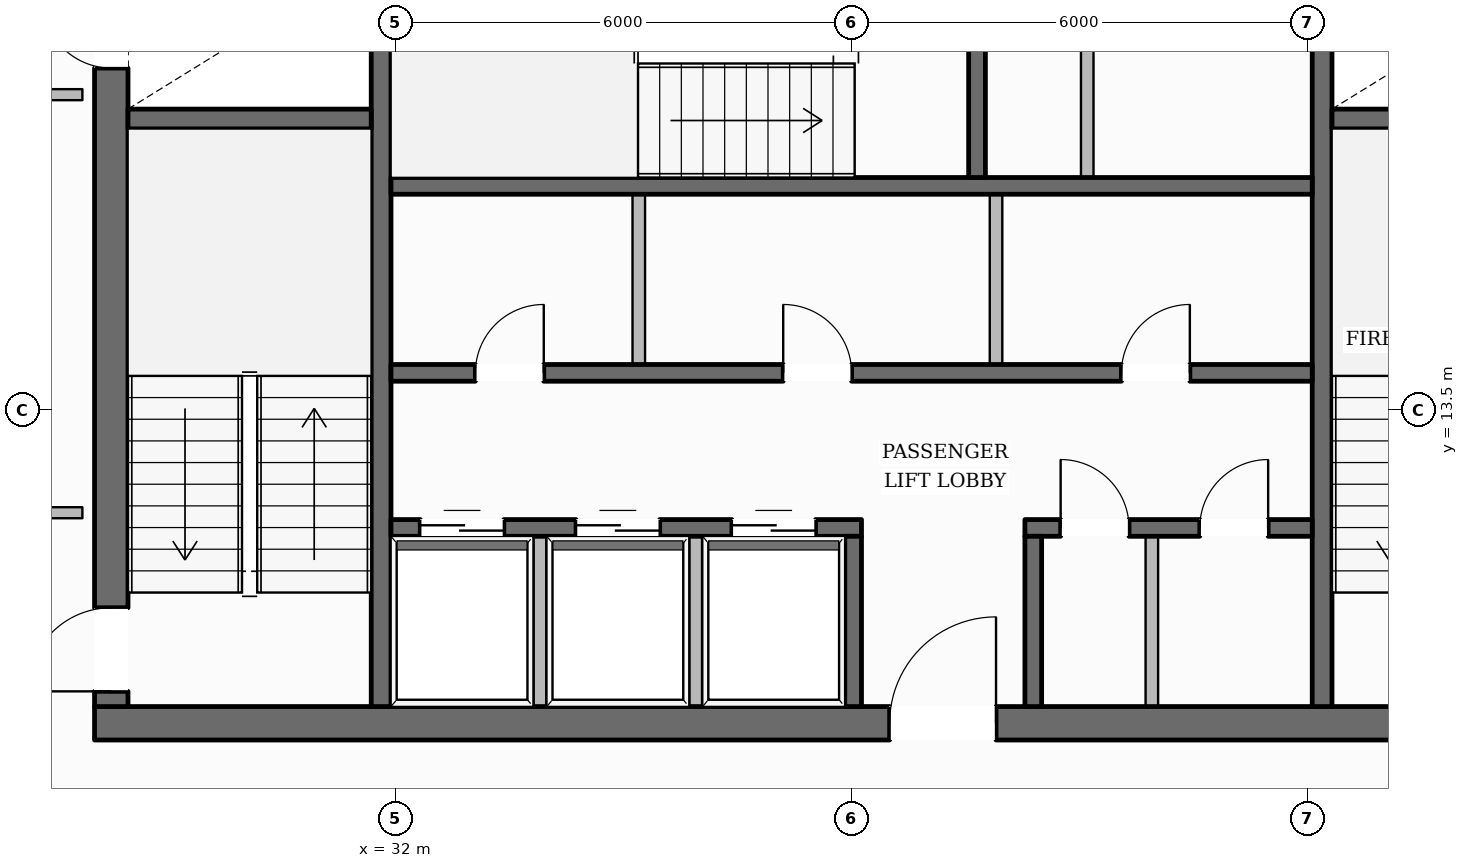
"""IFC4 building model, lengths in metres.
Left out: names, types, materials, properties, quantities, classifications, styles, units other than length and angle.
Written with IfcOpenShell. Run it as: python <this file> out.ifc"""

import sys

from ifc_helpers import new_model, si_unit, direction, frame, frame_2d, origin, place, context, subcontext, project, spatial, rectangle, extrude, element, fill, save


model = new_model("IFC4")
c1 = context("Model", 3, precision=1e-05, world=origin(), true_north=direction((0.0, 1.0)))
c2 = subcontext(c1, "Body", "Model", "MODEL_VIEW")
j1 = project(units=[si_unit("LENGTHUNIT", "METRE"), si_unit("PLANEANGLEUNIT", "RADIAN")], contexts=[c1])
p1 = place(None, origin())
s1 = spatial("IfcSite", under=j1, at=p1, CompositionType="ELEMENT")
p2 = place(p1, origin())
s2 = spatial("IfcBuilding", under=s1, at=p2, CompositionType="ELEMENT")
p3 = place(p2, frame((0.0, 0.0, 195.8)))
s3 = spatial("IfcBuildingStorey", under=s2, at=p3, CompositionType="ELEMENT", Elevation=195.8)
p4 = place(p3, frame((28.04, 9.38, 0.0), z_axis=(0.0, 0.0, 1.0), x_axis=(1.0, 0.0, 0.0)))
e1 = element("IfcWall", 1, at=p4, inside=s3, PredefinedType="SOLIDWALL", context=c2, shape_type="SweptSolid", body=[
    extrude(rectangle(XDim=19.92, YDim=0.44, at=frame_2d((9.96, 0.0))), origin(), (0.0, 0.0, 1.0), 3.6),
])
p5 = place(p4, frame((10.46, 0.0, 0.0)))
e2 = element("IfcOpeningElement", 2, at=p5, cuts=e1, PredefinedType="OPENING", context=c2, shape_type="SweptSolid", body=[
    extrude(rectangle(XDim=1.4, YDim=2.2, at=frame_2d((0.7, 1.1))), frame((0.0, 0.23, 0.0), z_axis=(0.0, -1.0, 0.0), x_axis=(1.0, 0.0, 0.0)), (0.0, 0.0, 1.0), 0.46),
])
p6 = place(p3, frame((28.26, 9.6, 0.0), z_axis=(0.0, 0.0, 1.0), x_axis=(0.0, 1.0, 0.0)))
e3 = element("IfcWall", 3, at=p6, inside=s3, PredefinedType="SOLIDWALL", context=c2, shape_type="SweptSolid", body=[
    extrude(rectangle(XDim=13.0, YDim=0.44, at=frame_2d((6.5, 0.0))), origin(), (0.0, 0.0, 1.0), 3.6),
])
p7 = place(p6, frame((0.2, 0.0, 0.0)))
e4 = element("IfcOpeningElement", 4, at=p7, cuts=e3, PredefinedType="OPENING", context=c2, shape_type="SweptSolid", body=[
    extrude(rectangle(XDim=1.1, YDim=2.15, at=frame_2d((0.55, 1.075))), frame((0.0, 0.23, 0.0), z_axis=(0.0, -1.0, 0.0), x_axis=(1.0, 0.0, 0.0)), (0.0, 0.0, 1.0), 0.46),
])
p8 = place(p6, frame((8.4, 0.0, 0.0)))
e5 = element("IfcOpeningElement", 5, at=p8, cuts=e3, PredefinedType="OPENING", context=c2, shape_type="SweptSolid", body=[
    extrude(rectangle(XDim=0.9, YDim=2.1, at=frame_2d((0.45, 1.05))), frame((0.0, 0.23, 0.0), z_axis=(0.0, -1.0, 0.0), x_axis=(1.0, 0.0, 0.0)), (0.0, 0.0, 1.0), 0.46),
])
p9 = place(p3, frame((31.81, 9.6, 0.0), z_axis=(0.0, 0.0, 1.0), x_axis=(0.0, 1.0, 0.0)))
e6 = element("IfcWall", 6, at=p9, inside=s3, PredefinedType="SHEAR", context=c2, shape_type="SweptSolid", body=[
    extrude(rectangle(XDim=13.0, YDim=0.26, at=frame_2d((6.5, 0.0))), origin(), (0.0, 0.0, 1.0), 3.6),
])
p10 = place(p9, frame((10.925, 0.0, 0.0)))
e7 = element("IfcOpeningElement", 7, at=p10, cuts=e6, PredefinedType="OPENING", context=c2, shape_type="SweptSolid", body=[
    extrude(rectangle(XDim=1.25, YDim=2.25, at=frame_2d((0.625, 1.125))), frame((0.0, 0.14, 0.0), z_axis=(0.0, -1.0, 0.0), x_axis=(1.0, 0.0, 0.0)), (0.0, 0.0, 1.0), 0.28),
])
p11 = place(p3, frame((44.19, 9.6, 0.0), z_axis=(0.0, 0.0, 1.0), x_axis=(0.0, 1.0, 0.0)))
e8 = element("IfcWall", 8, at=p11, inside=s3, PredefinedType="SHEAR", context=c2, shape_type="SweptSolid", body=[
    extrude(rectangle(XDim=13.0, YDim=0.26, at=frame_2d((6.5, 0.0))), origin(), (0.0, 0.0, 1.0), 3.6),
])
p12 = place(p11, frame((10.925, 0.0, 0.0)))
e9 = element("IfcOpeningElement", 9, at=p12, cuts=e8, PredefinedType="OPENING", context=c2, shape_type="SweptSolid", body=[
    extrude(rectangle(XDim=1.25, YDim=2.25, at=frame_2d((0.625, 1.125))), frame((0.0, 0.14, 0.0), z_axis=(0.0, -1.0, 0.0), x_axis=(1.0, 0.0, 0.0)), (0.0, 0.0, 1.0), 0.28),
])
for number, where, z_axis, x_axis in (
    (10, (28.48, 17.33, 0.0), (0.0, 0.0, 1.0), (1.0, 0.0, 0.0)),
    (11, (44.32, 17.33, 0.0), (0.0, 0.0, 1.0), (1.0, 0.0, 0.0)),
):
    element("IfcWall", number, at=place(p3, frame(where, z_axis=z_axis, x_axis=x_axis)), inside=s3, PredefinedType="SHEAR", context=c2, shape_type="SweptSolid", body=[
        extrude(rectangle(XDim=3.2, YDim=0.26, at=frame_2d((1.6, 0.0))), origin(), (0.0, 0.0, 1.0), 3.6),
    ])
p13 = place(p3, frame((31.94, 16.45, 0.0), z_axis=(0.0, 0.0, 1.0), x_axis=(1.0, 0.0, 0.0)))
e12 = element("IfcWall", 12, at=p13, inside=s3, PredefinedType="SOLIDWALL", context=c2, shape_type="SweptSolid", body=[
    extrude(rectangle(XDim=12.12, YDim=0.22, at=frame_2d((6.06, 0.0))), origin(), (0.0, 0.0, 1.0), 3.6),
])
p14 = place(p3, frame((39.65, 16.56, 0.0), z_axis=(0.0, 0.0, 1.0), x_axis=(0.0, 1.0, 0.0)))
e13 = element("IfcWall", 13, at=p14, inside=s3, PredefinedType="SOLIDWALL", context=c2, shape_type="SweptSolid", body=[
    extrude(rectangle(XDim=3.2, YDim=0.22, at=frame_2d((1.6, 0.0))), origin(), (0.0, 0.0, 1.0), 3.6),
])
p15 = place(p3, frame((31.94, 13.99, 0.0), z_axis=(0.0, 0.0, 1.0), x_axis=(1.0, 0.0, 0.0)))
e14 = element("IfcWall", 14, at=p15, inside=s3, PredefinedType="SOLIDWALL", context=c2, shape_type="SweptSolid", body=[
    extrude(rectangle(XDim=12.12, YDim=0.22, at=frame_2d((6.06, 0.0))), origin(), (0.0, 0.0, 1.0), 3.6),
])
p16 = place(p15, frame((1.11, 0.0, 0.0)))
e15 = element("IfcOpeningElement", 15, at=p16, cuts=e14, PredefinedType="OPENING", context=c2, shape_type="SweptSolid", body=[
    extrude(rectangle(XDim=0.9, YDim=2.1, at=frame_2d((0.45, 1.05))), frame((0.0, 0.12, 0.0), z_axis=(0.0, -1.0, 0.0), x_axis=(1.0, 0.0, 0.0)), (0.0, 0.0, 1.0), 0.24),
])
p17 = place(p15, frame((5.16, 0.0, 0.0)))
e16 = element("IfcOpeningElement", 16, at=p17, cuts=e14, PredefinedType="OPENING", context=c2, shape_type="SweptSolid", body=[
    extrude(rectangle(XDim=0.9, YDim=2.1, at=frame_2d((0.45, 1.05))), frame((0.0, 0.12, 0.0), z_axis=(0.0, -1.0, 0.0), x_axis=(1.0, 0.0, 0.0)), (0.0, 0.0, 1.0), 0.24),
])
p18 = place(p15, frame((9.61, 0.0, 0.0)))
e17 = element("IfcOpeningElement", 17, at=p18, cuts=e14, PredefinedType="OPENING", context=c2, shape_type="SweptSolid", body=[
    extrude(rectangle(XDim=0.9, YDim=2.1, at=frame_2d((0.45, 1.05))), frame((0.0, 0.12, 0.0), z_axis=(0.0, -1.0, 0.0), x_axis=(1.0, 0.0, 0.0)), (0.0, 0.0, 1.0), 0.24),
])
p19 = place(p3, frame((31.94, 11.95, 0.0), z_axis=(0.0, 0.0, 1.0), x_axis=(1.0, 0.0, 0.0)))
e18 = element("IfcWall", 18, at=p19, inside=s3, PredefinedType="SOLIDWALL", context=c2, shape_type="SweptSolid", body=[
    extrude(rectangle(XDim=6.19, YDim=0.22, at=frame_2d((3.095, 0.0))), origin(), (0.0, 0.0, 1.0), 3.6),
])
p20 = place(p19, frame((0.385, 0.0, 0.0)))
e19 = element("IfcOpeningElement", 19, at=p20, cuts=e18, PredefinedType="OPENING", context=c2, shape_type="SweptSolid", body=[
    extrude(rectangle(XDim=1.1, YDim=2.2, at=frame_2d((0.55, 1.1))), frame((0.0, 0.12, 0.0), z_axis=(0.0, -1.0, 0.0), x_axis=(1.0, 0.0, 0.0)), (0.0, 0.0, 1.0), 0.24),
])
p21 = place(p19, frame((2.435, 0.0, 0.0)))
e20 = element("IfcOpeningElement", 20, at=p21, cuts=e18, PredefinedType="OPENING", context=c2, shape_type="SweptSolid", body=[
    extrude(rectangle(XDim=1.1, YDim=2.2, at=frame_2d((0.55, 1.1))), frame((0.0, 0.12, 0.0), z_axis=(0.0, -1.0, 0.0), x_axis=(1.0, 0.0, 0.0)), (0.0, 0.0, 1.0), 0.24),
])
p22 = place(p19, frame((4.485, 0.0, 0.0)))
e21 = element("IfcOpeningElement", 21, at=p22, cuts=e18, PredefinedType="OPENING", context=c2, shape_type="SweptSolid", body=[
    extrude(rectangle(XDim=1.1, YDim=2.2, at=frame_2d((0.55, 1.1))), frame((0.0, 0.12, 0.0), z_axis=(0.0, -1.0, 0.0), x_axis=(1.0, 0.0, 0.0)), (0.0, 0.0, 1.0), 0.24),
])
p23 = place(p3, frame((40.28, 11.95, 0.0), z_axis=(0.0, 0.0, 1.0), x_axis=(1.0, 0.0, 0.0)))
e22 = element("IfcWall", 22, at=p23, inside=s3, PredefinedType="SOLIDWALL", context=c2, shape_type="SweptSolid", body=[
    extrude(rectangle(XDim=3.78, YDim=0.22, at=frame_2d((1.89, 0.0))), origin(), (0.0, 0.0, 1.0), 3.6),
])
p24 = place(p23, frame((0.47, 0.0, 0.0)))
e23 = element("IfcOpeningElement", 23, at=p24, cuts=e22, PredefinedType="OPENING", context=c2, shape_type="SweptSolid", body=[
    extrude(rectangle(XDim=0.9, YDim=2.1, at=frame_2d((0.45, 1.05))), frame((0.0, 0.12, 0.0), z_axis=(0.0, -1.0, 0.0), x_axis=(1.0, 0.0, 0.0)), (0.0, 0.0, 1.0), 0.24),
])
p25 = place(p23, frame((2.3, 0.0, 0.0)))
e24 = element("IfcOpeningElement", 24, at=p25, cuts=e22, PredefinedType="OPENING", context=c2, shape_type="SweptSolid", body=[
    extrude(rectangle(XDim=0.9, YDim=2.1, at=frame_2d((0.45, 1.05))), frame((0.0, 0.12, 0.0), z_axis=(0.0, -1.0, 0.0), x_axis=(1.0, 0.0, 0.0)), (0.0, 0.0, 1.0), 0.24),
])
for number, where, z_axis, x_axis in (
    (25, (38.02, 9.6, 0.0), (0.0, 0.0, 1.0), (0.0, 1.0, 0.0)),
    (26, (40.39, 9.6, 0.0), (0.0, 0.0, 1.0), (0.0, 1.0, 0.0)),
):
    element("IfcWall", number, at=place(p3, frame(where, z_axis=z_axis, x_axis=x_axis)), inside=s3, PredefinedType="SOLIDWALL", context=c2, shape_type="SweptSolid", body=[
        extrude(rectangle(XDim=2.24, YDim=0.22, at=frame_2d((1.12, 0.0))), origin(), (0.0, 0.0, 1.0), 3.6),
    ])
p26 = place(p3, frame((14.773, 11.555, 0.0), z_axis=(0.0, 0.0, 1.0), x_axis=(0.502113441051, 0.864801764751, 0.0)))
e27 = element("IfcWall", 27, at=p26, inside=s3, PredefinedType="STANDARD", context=c2, shape_type="SweptSolid", body=[
    extrude(rectangle(XDim=37.618, YDim=0.35, at=frame_2d((18.809, 0.0))), origin(), (0.0, 0.0, 1.0), 3.132),
])
p27 = place(p26, frame((33.36, 0.0, 0.65)))
e28 = element("IfcOpeningElement", 28, at=p27, cuts=e27, PredefinedType="OPENING", context=c2, shape_type="SweptSolid", body=[
    extrude(rectangle(XDim=1.45, YDim=1.75, at=frame_2d((0.725, 0.875))), frame((0.0, 0.185, 0.0), z_axis=(0.0, -1.0, 0.0), x_axis=(1.0, 0.0, 0.0)), (0.0, 0.0, 1.0), 0.37),
])
p28 = place(p26, frame((27.25, 0.0, 0.65)))
e29 = element("IfcOpeningElement", 29, at=p28, cuts=e27, PredefinedType="OPENING", context=c2, shape_type="SweptSolid", body=[
    extrude(rectangle(XDim=1.45, YDim=1.75, at=frame_2d((0.725, 0.875))), frame((0.0, 0.185, 0.0), z_axis=(0.0, -1.0, 0.0), x_axis=(1.0, 0.0, 0.0)), (0.0, 0.0, 1.0), 0.37),
])
p29 = place(p26, frame((15.03, 0.0, 0.65)))
e30 = element("IfcOpeningElement", 30, at=p29, cuts=e27, PredefinedType="OPENING", context=c2, shape_type="SweptSolid", body=[
    extrude(rectangle(XDim=1.45, YDim=1.75, at=frame_2d((0.725, 0.875))), frame((0.0, 0.185, 0.0), z_axis=(0.0, -1.0, 0.0), x_axis=(1.0, 0.0, 0.0)), (0.0, 0.0, 1.0), 0.37),
])
p30 = place(p26, frame((8.92, 0.0, 0.65)))
e31 = element("IfcOpeningElement", 31, at=p30, cuts=e27, PredefinedType="OPENING", context=c2, shape_type="SweptSolid", body=[
    extrude(rectangle(XDim=1.45, YDim=1.75, at=frame_2d((0.725, 0.875))), frame((0.0, 0.185, 0.0), z_axis=(0.0, -1.0, 0.0), x_axis=(1.0, 0.0, 0.0)), (0.0, 0.0, 1.0), 0.37),
])
p31 = place(p26, frame((2.811, 0.0, 0.65)))
e32 = element("IfcOpeningElement", 32, at=p31, cuts=e27, PredefinedType="OPENING", context=c2, shape_type="SweptSolid", body=[
    extrude(rectangle(XDim=1.45, YDim=1.75, at=frame_2d((0.725, 0.875))), frame((0.0, 0.185, 0.0), z_axis=(0.0, -1.0, 0.0), x_axis=(1.0, 0.0, 0.0)), (0.0, 0.0, 1.0), 0.37),
])
p32 = place(p3, frame((42.444, 44.024, 0.0), z_axis=(0.0, 0.0, 1.0), x_axis=(0.507770038723, -0.861492651028, 0.0)))
e33 = element("IfcWall", 33, at=p32, inside=s3, PredefinedType="STANDARD", context=c2, shape_type="SweptSolid", body=[
    extrude(rectangle(XDim=38.049, YDim=0.35, at=frame_2d((19.024, 0.0))), origin(), (0.0, 0.0, 1.0), 3.132),
])
p33 = place(p32, frame((33.752, 0.0, 0.65)))
e34 = element("IfcOpeningElement", 34, at=p33, cuts=e33, PredefinedType="OPENING", context=c2, shape_type="SweptSolid", body=[
    extrude(rectangle(XDim=1.45, YDim=1.75, at=frame_2d((0.725, 0.875))), frame((0.0, 0.185, 0.0), z_axis=(0.0, -1.0, 0.0), x_axis=(1.0, 0.0, 0.0)), (0.0, 0.0, 1.0), 0.37),
])
p34 = place(p32, frame((27.569, 0.0, 0.65)))
e35 = element("IfcOpeningElement", 35, at=p34, cuts=e33, PredefinedType="OPENING", context=c2, shape_type="SweptSolid", body=[
    extrude(rectangle(XDim=1.45, YDim=1.75, at=frame_2d((0.725, 0.875))), frame((0.0, 0.185, 0.0), z_axis=(0.0, -1.0, 0.0), x_axis=(1.0, 0.0, 0.0)), (0.0, 0.0, 1.0), 0.37),
])
p35 = place(p32, frame((15.204, 0.0, 0.65)))
e36 = element("IfcOpeningElement", 36, at=p35, cuts=e33, PredefinedType="OPENING", context=c2, shape_type="SweptSolid", body=[
    extrude(rectangle(XDim=1.45, YDim=1.75, at=frame_2d((0.725, 0.875))), frame((0.0, 0.185, 0.0), z_axis=(0.0, -1.0, 0.0), x_axis=(1.0, 0.0, 0.0)), (0.0, 0.0, 1.0), 0.37),
])
p36 = place(p32, frame((9.021, 0.0, 0.65)))
e37 = element("IfcOpeningElement", 37, at=p36, cuts=e33, PredefinedType="OPENING", context=c2, shape_type="SweptSolid", body=[
    extrude(rectangle(XDim=1.45, YDim=1.75, at=frame_2d((0.725, 0.875))), frame((0.0, 0.185, 0.0), z_axis=(0.0, -1.0, 0.0), x_axis=(1.0, 0.0, 0.0)), (0.0, 0.0, 1.0), 0.37),
])
p37 = place(p32, frame((2.839, 0.0, 0.65)))
e38 = element("IfcOpeningElement", 38, at=p37, cuts=e33, PredefinedType="OPENING", context=c2, shape_type="SweptSolid", body=[
    extrude(rectangle(XDim=1.45, YDim=1.75, at=frame_2d((0.725, 0.875))), frame((0.0, 0.185, 0.0), z_axis=(0.0, -1.0, 0.0), x_axis=(1.0, 0.0, 0.0)), (0.0, 0.0, 1.0), 0.37),
])
for number, where, z_axis, x_axis in (
    (39, (33.9, 9.52, 0.0), (0.0, 0.0, 1.0), (0.0, 1.0, 0.0)),
    (40, (35.95, 9.52, 0.0), (0.0, 0.0, 1.0), (0.0, 1.0, 0.0)),
):
    element("IfcWall", number, at=place(p3, frame(where, z_axis=z_axis, x_axis=x_axis)), inside=s3, PredefinedType="PARTITIONING", context=c2, shape_type="SweptSolid", body=[
        extrude(rectangle(XDim=2.32, YDim=0.165, at=frame_2d((1.16, 0.0))), origin(), (0.0, 0.0, 1.0), 3.6),
    ])
for number, where, z_axis, x_axis in (
    (41, (35.2, 14.1, 0.0), (0.0, 0.0, 1.0), (0.0, 1.0, 0.0)),
    (42, (39.9, 14.1, 0.0), (0.0, 0.0, 1.0), (0.0, 1.0, 0.0)),
):
    element("IfcWall", number, at=place(p3, frame(where, z_axis=z_axis, x_axis=x_axis)), inside=s3, PredefinedType="PARTITIONING", context=c2, shape_type="SweptSolid", body=[
        extrude(rectangle(XDim=2.24, YDim=0.165, at=frame_2d((1.12, 0.0))), origin(), (0.0, 0.0, 1.0), 3.6),
    ])
p38 = place(p3, frame((41.1, 16.56, 0.0), z_axis=(0.0, 0.0, 1.0), x_axis=(0.0, 1.0, 0.0)))
e43 = element("IfcWall", 43, at=p38, inside=s3, PredefinedType="PARTITIONING", context=c2, shape_type="SweptSolid", body=[
    extrude(rectangle(XDim=3.2, YDim=0.165, at=frame_2d((1.6, 0.0))), origin(), (0.0, 0.0, 1.0), 3.6),
])
p39 = place(p3, frame((41.95, 9.52, 0.0), z_axis=(0.0, 0.0, 1.0), x_axis=(0.0, 1.0, 0.0)))
e44 = element("IfcWall", 44, at=p39, inside=s3, PredefinedType="PARTITIONING", context=c2, shape_type="SweptSolid", body=[
    extrude(rectangle(XDim=2.32, YDim=0.165, at=frame_2d((1.16, 0.0))), origin(), (0.0, 0.0, 1.0), 3.6),
])
for number, where, z_axis, x_axis in (
    (45, (27.88, 17.65, 0.0), (0.0, 0.0, 1.0), (-1.0, 0.0, 0.0)),
    (46, (26.06, 12.15, 0.0), (0.0, 0.0, 1.0), (1.0, 0.0, 0.0)),
):
    element("IfcWall", number, at=place(p3, frame(where, z_axis=z_axis, x_axis=x_axis)), inside=s3, PredefinedType="PARTITIONING", context=c2, shape_type="SweptSolid", body=[
        extrude(rectangle(XDim=1.82, YDim=0.145, at=frame_2d((0.91, 0.0))), origin(), (0.0, 0.0, 1.0), 3.6),
    ])
p40 = place(p7, origin())
e47 = element("IfcDoor", 47, at=p40, inside=s3, OperationType="SINGLE_SWING_LEFT", PredefinedType="DOOR", context=c2, shape_type="SweptSolid", body=[
    extrude(rectangle(XDim=1.1, YDim=2.15, at=frame_2d((0.55, 1.075))), frame((0.0, 0.025, 0.0), z_axis=(0.0, -1.0, 0.0), x_axis=(1.0, 0.0, 0.0)), (0.0, 0.0, 1.0), 0.05),
])
fill(e4, e47)
p41 = place(p8, origin())
e48 = element("IfcDoor", 48, at=p41, inside=s3, OperationType="SINGLE_SWING_RIGHT", PredefinedType="DOOR", context=c2, shape_type="SweptSolid", body=[
    extrude(rectangle(XDim=0.9, YDim=2.1, at=frame_2d((0.45, 1.05))), frame((0.0, 0.025, 0.0), z_axis=(0.0, -1.0, 0.0), x_axis=(1.0, 0.0, 0.0)), (0.0, 0.0, 1.0), 0.05),
])
fill(e5, e48)
p42 = place(p5, origin())
e49 = element("IfcDoor", 49, at=p42, inside=s3, OperationType="SINGLE_SWING_RIGHT", PredefinedType="DOOR", context=c2, shape_type="SweptSolid", body=[
    extrude(rectangle(XDim=1.4, YDim=2.2, at=frame_2d((0.7, 1.1))), frame((0.0, 0.025, 0.0), z_axis=(0.0, -1.0, 0.0), x_axis=(1.0, 0.0, 0.0)), (0.0, 0.0, 1.0), 0.05),
])
fill(e2, e49)
p43 = place(p20, origin())
e50 = element("IfcDoor", 50, at=p43, inside=s3, OperationType="DOUBLE_DOOR_SLIDING", PredefinedType="DOOR", context=c2, shape_type="SweptSolid", body=[
    extrude(rectangle(XDim=1.1, YDim=2.2, at=frame_2d((0.55, 1.1))), frame((0.0, 0.025, 0.0), z_axis=(0.0, -1.0, 0.0), x_axis=(1.0, 0.0, 0.0)), (0.0, 0.0, 1.0), 0.05),
])
fill(e19, e50)
p44 = place(p21, origin())
e51 = element("IfcDoor", 51, at=p44, inside=s3, OperationType="DOUBLE_DOOR_SLIDING", PredefinedType="DOOR", context=c2, shape_type="SweptSolid", body=[
    extrude(rectangle(XDim=1.1, YDim=2.2, at=frame_2d((0.55, 1.1))), frame((0.0, 0.025, 0.0), z_axis=(0.0, -1.0, 0.0), x_axis=(1.0, 0.0, 0.0)), (0.0, 0.0, 1.0), 0.05),
])
fill(e20, e51)
p45 = place(p22, origin())
e52 = element("IfcDoor", 52, at=p45, inside=s3, OperationType="DOUBLE_DOOR_SLIDING", PredefinedType="DOOR", context=c2, shape_type="SweptSolid", body=[
    extrude(rectangle(XDim=1.1, YDim=2.2, at=frame_2d((0.55, 1.1))), frame((0.0, 0.025, 0.0), z_axis=(0.0, -1.0, 0.0), x_axis=(1.0, 0.0, 0.0)), (0.0, 0.0, 1.0), 0.05),
])
fill(e21, e52)
p46 = place(p16, origin())
e53 = element("IfcDoor", 53, at=p46, inside=s3, OperationType="SINGLE_SWING_RIGHT", PredefinedType="DOOR", context=c2, shape_type="SweptSolid", body=[
    extrude(rectangle(XDim=0.9, YDim=2.1, at=frame_2d((0.45, 1.05))), frame((0.0, 0.025, 0.0), z_axis=(0.0, -1.0, 0.0), x_axis=(1.0, 0.0, 0.0)), (0.0, 0.0, 1.0), 0.05),
])
fill(e15, e53)
p47 = place(p17, origin())
e54 = element("IfcDoor", 54, at=p47, inside=s3, OperationType="SINGLE_SWING_LEFT", PredefinedType="DOOR", context=c2, shape_type="SweptSolid", body=[
    extrude(rectangle(XDim=0.9, YDim=2.1, at=frame_2d((0.45, 1.05))), frame((0.0, 0.025, 0.0), z_axis=(0.0, -1.0, 0.0), x_axis=(1.0, 0.0, 0.0)), (0.0, 0.0, 1.0), 0.05),
])
fill(e16, e54)
p48 = place(p18, origin())
e55 = element("IfcDoor", 55, at=p48, inside=s3, OperationType="SINGLE_SWING_RIGHT", PredefinedType="DOOR", context=c2, shape_type="SweptSolid", body=[
    extrude(rectangle(XDim=0.9, YDim=2.1, at=frame_2d((0.45, 1.05))), frame((0.0, 0.025, 0.0), z_axis=(0.0, -1.0, 0.0), x_axis=(1.0, 0.0, 0.0)), (0.0, 0.0, 1.0), 0.05),
])
fill(e17, e55)
p49 = place(p24, origin())
e56 = element("IfcDoor", 56, at=p49, inside=s3, OperationType="SINGLE_SWING_LEFT", PredefinedType="DOOR", context=c2, shape_type="SweptSolid", body=[
    extrude(rectangle(XDim=0.9, YDim=2.1, at=frame_2d((0.45, 1.05))), frame((0.0, 0.025, 0.0), z_axis=(0.0, -1.0, 0.0), x_axis=(1.0, 0.0, 0.0)), (0.0, 0.0, 1.0), 0.05),
])
fill(e23, e56)
p50 = place(p25, origin())
e57 = element("IfcDoor", 57, at=p50, inside=s3, OperationType="SINGLE_SWING_RIGHT", PredefinedType="DOOR", context=c2, shape_type="SweptSolid", body=[
    extrude(rectangle(XDim=0.9, YDim=2.1, at=frame_2d((0.45, 1.05))), frame((0.0, 0.025, 0.0), z_axis=(0.0, -1.0, 0.0), x_axis=(1.0, 0.0, 0.0)), (0.0, 0.0, 1.0), 0.05),
])
fill(e24, e57)
save(model, sys.argv[1])
